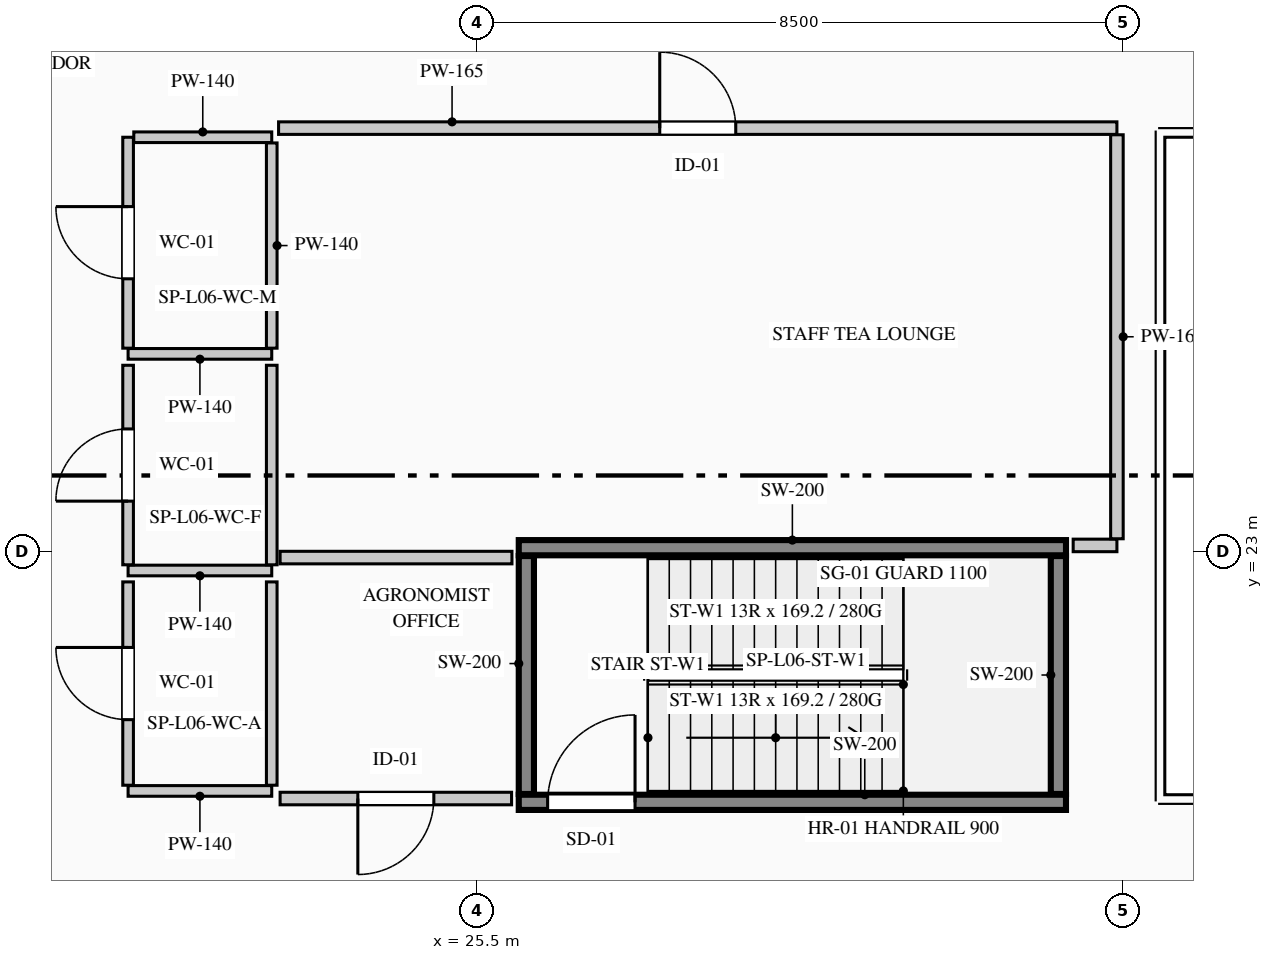
"""IFC4 building model, lengths in metres.
Left out: names, types, materials, properties, quantities, classifications, styles, units other than length and angle.
Written with IfcOpenShell. Run it as: python <this file> out.ifc"""

import sys

from ifc_helpers import new_model, si_unit, direction, frame, frame_2d, origin, place, context, subcontext, project, spatial, rectangle, extrude, element, fill, save


model = new_model("IFC4")
c1 = context("Model", 3, precision=1e-05, world=origin(), true_north=direction((0.0, 1.0)))
c2 = subcontext(c1, "Body", "Model", "MODEL_VIEW")
j1 = project(units=[si_unit("LENGTHUNIT", "METRE"), si_unit("PLANEANGLEUNIT", "RADIAN")], contexts=[c1])
p1 = place(None, origin())
s1 = spatial("IfcSite", under=j1, at=p1, CompositionType="ELEMENT")
p2 = place(p1, origin())
s2 = spatial("IfcBuilding", under=s1, at=p2, CompositionType="ELEMENT")
p3 = place(p2, frame((0.0, 0.0, 27.0)))
s3 = spatial("IfcBuildingStorey", under=s2, at=p3, CompositionType="ELEMENT", Elevation=27.0)
p4 = place(p3, frame((26.05, 19.7, 0.0), z_axis=(0.0, 0.0, 1.0), x_axis=(1.0, 0.0, 0.0)))
e1 = element("IfcWall", 1, at=p4, inside=s3, PredefinedType="SHEAR", context=c2, shape_type="SweptSolid", body=[
    extrude(rectangle(XDim=7.2, YDim=0.2, at=frame_2d((3.6, 0.0))), origin(), (0.0, 0.0, 1.0), 4.4),
])
p5 = place(p4, frame((0.38, 0.0, 0.0)))
e2 = element("IfcOpeningElement", 2, at=p5, cuts=e1, PredefinedType="OPENING", context=c2, shape_type="SweptSolid", body=[
    extrude(rectangle(XDim=1.15, YDim=2.2, at=frame_2d((0.575, 1.1))), frame((0.0, 0.11, 0.0), z_axis=(0.0, -1.0, 0.0), x_axis=(1.0, 0.0, 0.0)), (0.0, 0.0, 1.0), 0.22),
])
p6 = place(p3, frame((26.05, 23.05, 0.0), z_axis=(0.0, 0.0, 1.0), x_axis=(1.0, 0.0, 0.0)))
e3 = element("IfcWall", 3, at=p6, inside=s3, PredefinedType="SHEAR", context=c2, shape_type="SweptSolid", body=[
    extrude(rectangle(XDim=7.2, YDim=0.2, at=frame_2d((3.6, 0.0))), origin(), (0.0, 0.0, 1.0), 4.4),
])
for number, where, z_axis, x_axis in (
    (4, (26.15, 19.81, 0.0), (0.0, 0.0, 1.0), (0.0, 1.0, 0.0)),
    (5, (33.15, 19.81, 0.0), (0.0, 0.0, 1.0), (0.0, 1.0, 0.0)),
):
    element("IfcWall", number, at=place(p3, frame(where, z_axis=z_axis, x_axis=x_axis)), inside=s3, PredefinedType="SHEAR", context=c2, shape_type="SweptSolid", body=[
        extrude(rectangle(XDim=3.13, YDim=0.2, at=frame_2d((1.565, 0.0))), origin(), (0.0, 0.0, 1.0), 4.4),
    ])
p7 = place(p3, frame((22.8, 25.6, 0.0), z_axis=(0.0, 0.0, 1.0), x_axis=(-1.0, 0.0, 0.0)))
e6 = element("IfcWall", 6, at=p7, inside=s3, PredefinedType="PARTITIONING", context=c2, shape_type="SweptSolid", body=[
    extrude(rectangle(XDim=1.89, YDim=0.14, at=frame_2d((0.945, 0.0))), origin(), (0.0, 0.0, 1.0), 4.1),
])
p8 = place(p3, frame((20.91, 25.675, 0.0), z_axis=(0.0, 0.0, 1.0), x_axis=(0.0, 1.0, 0.0)))
e7 = element("IfcWall", 7, at=p8, inside=s3, PredefinedType="PARTITIONING", context=c2, shape_type="SweptSolid", body=[
    extrude(rectangle(XDim=2.775, YDim=0.14, at=frame_2d((1.387, 0.0))), origin(), (0.0, 0.0, 1.0), 4.1),
])
p9 = place(p8, frame((0.913, 0.0, 0.0)))
e8 = element("IfcOpeningElement", 8, at=p9, cuts=e7, PredefinedType="OPENING", context=c2, shape_type="SweptSolid", body=[
    extrude(rectangle(XDim=0.95, YDim=2.15, at=frame_2d((0.475, 1.075))), frame((0.0, 0.08, 0.0), z_axis=(0.0, -1.0, 0.0), x_axis=(1.0, 0.0, 0.0)), (0.0, 0.0, 1.0), 0.16),
])
p10 = place(p3, frame((20.985, 28.45, 0.0), z_axis=(0.0, 0.0, 1.0), x_axis=(1.0, 0.0, 0.0)))
e9 = element("IfcWall", 9, at=p10, inside=s3, PredefinedType="PARTITIONING", context=c2, shape_type="SweptSolid", body=[
    extrude(rectangle(XDim=1.815, YDim=0.14, at=frame_2d((0.907, 0.0))), origin(), (0.0, 0.0, 1.0), 4.1),
])
p11 = place(p3, frame((22.8, 28.375, 0.0), z_axis=(0.0, 0.0, 1.0), x_axis=(0.0, -1.0, 0.0)))
e10 = element("IfcWall", 10, at=p11, inside=s3, PredefinedType="PARTITIONING", context=c2, shape_type="SweptSolid", body=[
    extrude(rectangle(XDim=2.7, YDim=0.14, at=frame_2d((1.35, 0.0))), origin(), (0.0, 0.0, 1.0), 3.725),
])
p12 = place(p3, frame((22.8, 22.75, 0.0), z_axis=(0.0, 0.0, 1.0), x_axis=(-1.0, 0.0, 0.0)))
e11 = element("IfcWall", 11, at=p12, inside=s3, PredefinedType="PARTITIONING", context=c2, shape_type="SweptSolid", body=[
    extrude(rectangle(XDim=1.89, YDim=0.14, at=frame_2d((0.945, 0.0))), origin(), (0.0, 0.0, 1.0), 4.1),
])
p13 = place(p3, frame((20.91, 22.825, 0.0), z_axis=(0.0, 0.0, 1.0), x_axis=(0.0, 1.0, 0.0)))
e12 = element("IfcWall", 12, at=p13, inside=s3, PredefinedType="PARTITIONING", context=c2, shape_type="SweptSolid", body=[
    extrude(rectangle(XDim=2.625, YDim=0.14, at=frame_2d((1.312, 0.0))), origin(), (0.0, 0.0, 1.0), 4.1),
])
p14 = place(p13, frame((0.837, 0.0, 0.0)))
e13 = element("IfcOpeningElement", 13, at=p14, cuts=e12, PredefinedType="OPENING", context=c2, shape_type="SweptSolid", body=[
    extrude(rectangle(XDim=0.95, YDim=2.15, at=frame_2d((0.475, 1.075))), frame((0.0, 0.08, 0.0), z_axis=(0.0, -1.0, 0.0), x_axis=(1.0, 0.0, 0.0)), (0.0, 0.0, 1.0), 0.16),
])
p15 = place(p3, frame((22.8, 25.45, 0.0), z_axis=(0.0, 0.0, 1.0), x_axis=(0.0, -1.0, 0.0)))
e14 = element("IfcWall", 14, at=p15, inside=s3, PredefinedType="PARTITIONING", context=c2, shape_type="SweptSolid", body=[
    extrude(rectangle(XDim=2.625, YDim=0.14, at=frame_2d((1.312, 0.0))), origin(), (0.0, 0.0, 1.0), 3.725),
])
p16 = place(p3, frame((22.8, 19.85, 0.0), z_axis=(0.0, 0.0, 1.0), x_axis=(-1.0, 0.0, 0.0)))
e15 = element("IfcWall", 15, at=p16, inside=s3, PredefinedType="PARTITIONING", context=c2, shape_type="SweptSolid", body=[
    extrude(rectangle(XDim=1.89, YDim=0.14, at=frame_2d((0.945, 0.0))), origin(), (0.0, 0.0, 1.0), 4.1),
])
p17 = place(p3, frame((20.91, 19.925, 0.0), z_axis=(0.0, 0.0, 1.0), x_axis=(0.0, 1.0, 0.0)))
e16 = element("IfcWall", 16, at=p17, inside=s3, PredefinedType="PARTITIONING", context=c2, shape_type="SweptSolid", body=[
    extrude(rectangle(XDim=2.675, YDim=0.14, at=frame_2d((1.337, 0.0))), origin(), (0.0, 0.0, 1.0), 4.1),
])
p18 = place(p17, frame((0.863, 0.0, 0.0)))
e17 = element("IfcOpeningElement", 17, at=p18, cuts=e16, PredefinedType="OPENING", context=c2, shape_type="SweptSolid", body=[
    extrude(rectangle(XDim=0.95, YDim=2.15, at=frame_2d((0.475, 1.075))), frame((0.0, 0.08, 0.0), z_axis=(0.0, -1.0, 0.0), x_axis=(1.0, 0.0, 0.0)), (0.0, 0.0, 1.0), 0.16),
])
p19 = place(p3, frame((22.8, 22.6, 0.0), z_axis=(0.0, 0.0, 1.0), x_axis=(0.0, -1.0, 0.0)))
e18 = element("IfcWall", 18, at=p19, inside=s3, PredefinedType="PARTITIONING", context=c2, shape_type="SweptSolid", body=[
    extrude(rectangle(XDim=2.675, YDim=0.14, at=frame_2d((1.337, 0.0))), origin(), (0.0, 0.0, 1.0), 3.725),
])
p20 = place(p3, frame((25.956, 19.75, 0.0), z_axis=(0.0, 0.0, 1.0), x_axis=(-1.0, 0.0, 0.0)))
e19 = element("IfcWall", 19, at=p20, inside=s3, PredefinedType="PARTITIONING", context=c2, shape_type="SweptSolid", body=[
    extrude(rectangle(XDim=3.046, YDim=0.165, at=frame_2d((1.523, 0.0))), origin(), (0.0, 0.0, 1.0), 4.1),
])
p21 = place(p20, frame((1.023, 0.0, 0.0)))
e20 = element("IfcOpeningElement", 20, at=p21, cuts=e19, PredefinedType="OPENING", context=c2, shape_type="SweptSolid", body=[
    extrude(rectangle(XDim=1.0, YDim=2.15, at=frame_2d((0.5, 1.075))), frame((0.0, 0.093, 0.0), z_axis=(0.0, -1.0, 0.0), x_axis=(1.0, 0.0, 0.0)), (0.0, 0.0, 1.0), 0.185),
])
p22 = place(p3, frame((22.91, 22.92, 0.0), z_axis=(0.0, 0.0, 1.0), x_axis=(1.0, 0.0, 0.0)))
e21 = element("IfcWall", 21, at=p22, inside=s3, PredefinedType="PARTITIONING", context=c2, shape_type="SweptSolid", body=[
    extrude(rectangle(XDim=3.051, YDim=0.165, at=frame_2d((1.525, 0.0))), origin(), (0.0, 0.0, 1.0), 4.1),
])
p23 = place(p3, frame((33.92, 23.08, 0.0), z_axis=(0.0, 0.0, 1.0), x_axis=(-1.0, 0.0, 0.0)))
e22 = element("IfcWall", 22, at=p23, inside=s3, PredefinedType="PARTITIONING", context=c2, shape_type="SweptSolid", body=[
    extrude(rectangle(XDim=0.575, YDim=0.165, at=frame_2d((0.288, 0.0))), origin(), (0.0, 0.0, 1.0), 4.1),
])
p24 = place(p3, frame((22.89, 28.57, 0.0), z_axis=(0.0, 0.0, 1.0), x_axis=(1.0, 0.0, 0.0)))
e23 = element("IfcWall", 23, at=p24, inside=s3, PredefinedType="PARTITIONING", context=c2, shape_type="SweptSolid", body=[
    extrude(rectangle(XDim=11.03, YDim=0.165, at=frame_2d((5.515, 0.0))), origin(), (0.0, 0.0, 1.0), 3.885),
])
p25 = place(p24, frame((5.015, 0.0, 0.0)))
e24 = element("IfcOpeningElement", 24, at=p25, cuts=e23, PredefinedType="OPENING", context=c2, shape_type="SweptSolid", body=[
    extrude(rectangle(XDim=1.0, YDim=2.15, at=frame_2d((0.5, 1.075))), frame((0.0, 0.093, 0.0), z_axis=(0.0, -1.0, 0.0), x_axis=(1.0, 0.0, 0.0)), (0.0, 0.0, 1.0), 0.185),
])
p26 = place(p3, frame((33.92, 28.482, 0.0), z_axis=(0.0, 0.0, 1.0), x_axis=(0.0, -1.0, 0.0)))
e25 = element("IfcWall", 25, at=p26, inside=s3, PredefinedType="PARTITIONING", context=c2, shape_type="SweptSolid", body=[
    extrude(rectangle(XDim=5.315, YDim=0.165, at=frame_2d((2.657, 0.0))), origin(), (0.0, 0.0, 1.0), 3.285),
])
p27 = place(p5, origin())
e26 = element("IfcDoor", 26, at=p27, inside=s3, OperationType="SINGLE_SWING_RIGHT", PredefinedType="DOOR", context=c2, shape_type="SweptSolid", body=[
    extrude(rectangle(XDim=1.15, YDim=2.2, at=frame_2d((0.575, 1.1))), frame((0.0, 0.025, 0.0), z_axis=(0.0, -1.0, 0.0), x_axis=(1.0, 0.0, 0.0)), (0.0, 0.0, 1.0), 0.05),
])
fill(e2, e26)
p28 = place(p9, origin())
e27 = element("IfcDoor", 27, at=p28, inside=s3, OperationType="SINGLE_SWING_RIGHT", PredefinedType="DOOR", context=c2, shape_type="SweptSolid", body=[
    extrude(rectangle(XDim=0.95, YDim=2.15, at=frame_2d((0.475, 1.075))), frame((0.0, 0.025, 0.0), z_axis=(0.0, -1.0, 0.0), x_axis=(1.0, 0.0, 0.0)), (0.0, 0.0, 1.0), 0.05),
])
fill(e8, e27)
p29 = place(p14, origin())
e28 = element("IfcDoor", 28, at=p29, inside=s3, OperationType="SINGLE_SWING_LEFT", PredefinedType="DOOR", context=c2, shape_type="SweptSolid", body=[
    extrude(rectangle(XDim=0.95, YDim=2.15, at=frame_2d((0.475, 1.075))), frame((0.0, 0.025, 0.0), z_axis=(0.0, -1.0, 0.0), x_axis=(1.0, 0.0, 0.0)), (0.0, 0.0, 1.0), 0.05),
])
fill(e13, e28)
p30 = place(p18, origin())
e29 = element("IfcDoor", 29, at=p30, inside=s3, OperationType="SINGLE_SWING_RIGHT", PredefinedType="DOOR", context=c2, shape_type="SweptSolid", body=[
    extrude(rectangle(XDim=0.95, YDim=2.15, at=frame_2d((0.475, 1.075))), frame((0.0, 0.025, 0.0), z_axis=(0.0, -1.0, 0.0), x_axis=(1.0, 0.0, 0.0)), (0.0, 0.0, 1.0), 0.05),
])
fill(e17, e29)
p31 = place(p21, origin())
e30 = element("IfcDoor", 30, at=p31, inside=s3, OperationType="SINGLE_SWING_RIGHT", PredefinedType="DOOR", context=c2, shape_type="SweptSolid", body=[
    extrude(rectangle(XDim=1.0, YDim=2.15, at=frame_2d((0.5, 1.075))), frame((0.0, 0.025, 0.0), z_axis=(0.0, -1.0, 0.0), x_axis=(1.0, 0.0, 0.0)), (0.0, 0.0, 1.0), 0.05),
])
fill(e20, e30)
p32 = place(p25, origin())
e31 = element("IfcDoor", 31, at=p32, inside=s3, OperationType="SINGLE_SWING_LEFT", PredefinedType="DOOR", context=c2, shape_type="SweptSolid", body=[
    extrude(rectangle(XDim=1.0, YDim=2.15, at=frame_2d((0.5, 1.075))), frame((0.0, 0.025, 0.0), z_axis=(0.0, -1.0, 0.0), x_axis=(1.0, 0.0, 0.0)), (0.0, 0.0, 1.0), 0.05),
])
fill(e24, e31)
save(model, sys.argv[1])
